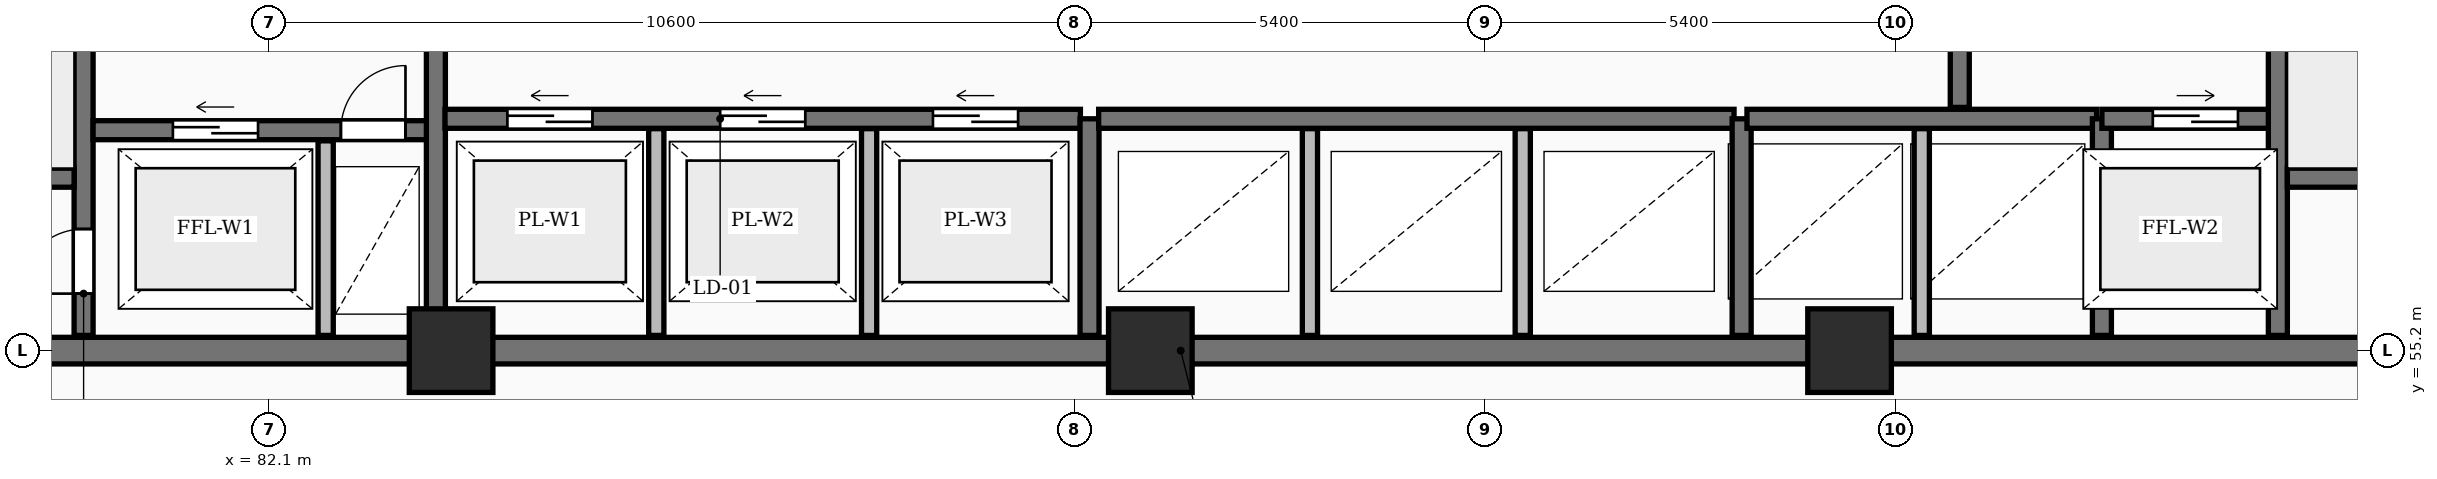
"""IFC4 building model, lengths in metres.
Left out: names, types, materials, properties, quantities, classifications, styles, units other than length and angle.
Written with IfcOpenShell. Run it as: python <this file> out.ifc"""

import sys

from ifc_helpers import new_model, si_unit, direction, frame, frame_2d, origin, origin_2d, place, context, subcontext, project, spatial, rectangle, extrude, element, fill, save


model = new_model("IFC4")
c1 = context("Model", 3, precision=1e-05, world=origin(), true_north=direction((0.0, 1.0)))
c2 = subcontext(c1, "Body", "Model", "MODEL_VIEW")
j1 = project(units=[si_unit("LENGTHUNIT", "METRE"), si_unit("PLANEANGLEUNIT", "RADIAN")], contexts=[c1])
p1 = place(None, origin())
s1 = spatial("IfcSite", under=j1, at=p1, CompositionType="ELEMENT")
p2 = place(p1, origin())
s2 = spatial("IfcBuilding", under=s1, at=p2, CompositionType="ELEMENT")
p3 = place(p2, frame((0.0, 0.0, 5.4)))
s3 = spatial("IfcBuildingStorey", under=s2, at=p3, CompositionType="ELEMENT", Elevation=5.4)
for number, where, z_axis, x_axis in (
    (1, (84.5, 55.2, 0.0), (0.0, 0.0, 1.0), (1.0, 0.0, 0.0)),
    (2, (93.7, 55.2, 0.0), (0.0, 0.0, 1.0), (1.0, 0.0, 0.0)),
    (3, (102.9, 55.2, 0.0), (0.0, 0.0, 1.0), (1.0, 0.0, 0.0)),
):
    element("IfcColumn", number, at=place(p3, frame(where, z_axis=z_axis, x_axis=x_axis)), inside=s3, PredefinedType="COLUMN", context=c2, shape_type="SweptSolid", body=[
        extrude(rectangle(XDim=1.1, YDim=1.1, at=origin_2d()), origin(), (0.0, 0.0, 1.0), 4.6),
    ])
p4 = place(p3, frame((75.95, 55.2, 0.0), z_axis=(0.0, 0.0, 1.0), x_axis=(1.0, 0.0, 0.0)))
e4 = element("IfcWall", 4, at=p4, inside=s3, PredefinedType="SHEAR", context=c2, shape_type="SweptSolid", body=[
    extrude(rectangle(XDim=36.3, YDim=0.35, at=frame_2d((18.15, 0.0))), origin(), (0.0, 0.0, 1.0), 4.6),
])
p5 = place(p3, frame((79.665, 55.4, 0.0), z_axis=(0.0, 0.0, 1.0), x_axis=(0.0, 1.0, 0.0)))
e5 = element("IfcWall", 5, at=p5, inside=s3, PredefinedType="SHEAR", context=c2, shape_type="SweptSolid", body=[
    extrude(rectangle(XDim=11.6, YDim=0.25, at=frame_2d((5.8, 0.0))), origin(), (0.0, 0.0, 1.0), 4.6),
])
p6 = place(p5, frame((0.55, 0.0, 0.0)))
e6 = element("IfcOpeningElement", 6, at=p6, cuts=e5, PredefinedType="OPENING", context=c2, shape_type="SweptSolid", body=[
    extrude(rectangle(XDim=0.85, YDim=2.05, at=frame_2d((0.425, 1.025))), frame((0.0, 0.135, 0.0), z_axis=(0.0, -1.0, 0.0), x_axis=(1.0, 0.0, 0.0)), (0.0, 0.0, 1.0), 0.27),
])
p7 = place(p5, frame((8.4, 0.0, 0.0)))
e7 = element("IfcOpeningElement", 7, at=p7, cuts=e5, PredefinedType="OPENING", context=c2, shape_type="SweptSolid", body=[
    extrude(rectangle(XDim=1.1, YDim=2.1, at=frame_2d((0.55, 1.05))), frame((0.0, 0.135, 0.0), z_axis=(0.0, -1.0, 0.0), x_axis=(1.0, 0.0, 0.0)), (0.0, 0.0, 1.0), 0.27),
])
p8 = place(p5, frame((10.25, 0.0, 0.0)))
e8 = element("IfcOpeningElement", 8, at=p8, cuts=e5, PredefinedType="OPENING", context=c2, shape_type="SweptSolid", body=[
    extrude(rectangle(XDim=0.85, YDim=2.05, at=frame_2d((0.425, 1.025))), frame((0.0, 0.135, 0.0), z_axis=(0.0, -1.0, 0.0), x_axis=(1.0, 0.0, 0.0)), (0.0, 0.0, 1.0), 0.27),
])
p9 = place(p3, frame((76.3, 57.475, 0.0), z_axis=(0.0, 0.0, 1.0), x_axis=(1.0, 0.0, 0.0)))
e9 = element("IfcWall", 9, at=p9, inside=s3, PredefinedType="SHEAR", context=c2, shape_type="SweptSolid", body=[
    extrude(rectangle(XDim=3.24, YDim=0.25, at=frame_2d((1.62, 0.0))), origin(), (0.0, 0.0, 1.0), 4.6),
])
p10 = place(p3, frame((79.79, 58.1, 0.0), z_axis=(0.0, 0.0, 1.0), x_axis=(1.0, 0.0, 0.0)))
e10 = element("IfcWall", 10, at=p10, inside=s3, PredefinedType="SHEAR", context=c2, shape_type="SweptSolid", body=[
    extrude(rectangle(XDim=4.39, YDim=0.25, at=frame_2d((2.195, 0.0))), origin(), (0.0, 0.0, 1.0), 4.6),
])
p11 = place(p10, frame((1.05, 0.0, 0.0)))
e11 = element("IfcOpeningElement", 11, at=p11, cuts=e10, PredefinedType="OPENING", context=c2, shape_type="SweptSolid", body=[
    extrude(rectangle(XDim=1.12, YDim=2.12, at=frame_2d((0.56, 1.06))), frame((0.0, 0.135, 0.0), z_axis=(0.0, -1.0, 0.0), x_axis=(1.0, 0.0, 0.0)), (0.0, 0.0, 1.0), 0.27),
])
p12 = place(p10, frame((3.26, 0.0, 0.0)))
e12 = element("IfcOpeningElement", 12, at=p12, cuts=e10, PredefinedType="OPENING", context=c2, shape_type="SweptSolid", body=[
    extrude(rectangle(XDim=0.85, YDim=2.05, at=frame_2d((0.425, 1.025))), frame((0.0, 0.135, 0.0), z_axis=(0.0, -1.0, 0.0), x_axis=(1.0, 0.0, 0.0)), (0.0, 0.0, 1.0), 0.27),
])
p13 = place(p3, frame((82.85, 55.4, 0.0), z_axis=(0.0, 0.0, 1.0), x_axis=(0.0, 1.0, 0.0)))
e13 = element("IfcWall", 13, at=p13, inside=s3, PredefinedType="PARTITIONING", context=c2, shape_type="SweptSolid", body=[
    extrude(rectangle(XDim=2.56, YDim=0.2, at=frame_2d((1.28, 0.0))), origin(), (0.0, 0.0, 1.0), 4.3),
])
p14 = place(p3, frame((84.3, 55.4, 0.0), z_axis=(0.0, 0.0, 1.0), x_axis=(0.0, 1.0, 0.0)))
e14 = element("IfcWall", 14, at=p14, inside=s3, PredefinedType="SHEAR", context=c2, shape_type="SweptSolid", body=[
    extrude(rectangle(XDim=11.6, YDim=0.25, at=frame_2d((5.8, 0.0))), origin(), (0.0, 0.0, 1.0), 4.6),
])
p15 = place(p14, frame((5.2, 0.0, 0.0)))
e15 = element("IfcOpeningElement", 15, at=p15, cuts=e14, PredefinedType="OPENING", context=c2, shape_type="SweptSolid", body=[
    extrude(rectangle(XDim=1.1, YDim=2.1, at=frame_2d((0.55, 1.05))), frame((0.0, 0.135, 0.0), z_axis=(0.0, -1.0, 0.0), x_axis=(1.0, 0.0, 0.0)), (0.0, 0.0, 1.0), 0.27),
])
for number, where, z_axis, x_axis in (
    (16, (87.2, 55.4, 0.0), (0.0, 0.0, 1.0), (0.0, 1.0, 0.0)),
    (17, (90.0, 55.4, 0.0), (0.0, 0.0, 1.0), (0.0, 1.0, 0.0)),
):
    element("IfcWall", number, at=place(p3, frame(where, z_axis=z_axis, x_axis=x_axis)), inside=s3, PredefinedType="PARTITIONING", context=c2, shape_type="SweptSolid", body=[
        extrude(rectangle(XDim=2.72, YDim=0.2, at=frame_2d((1.36, 0.0))), origin(), (0.0, 0.0, 1.0), 4.3),
    ])
p16 = place(p3, frame((84.42, 58.25, 0.0), z_axis=(0.0, 0.0, 1.0), x_axis=(1.0, 0.0, 0.0)))
e18 = element("IfcWall", 18, at=p16, inside=s3, PredefinedType="SHEAR", context=c2, shape_type="SweptSolid", body=[
    extrude(rectangle(XDim=8.36, YDim=0.25, at=frame_2d((4.18, 0.0))), origin(), (0.0, 0.0, 1.0), 4.6),
])
p17 = place(p16, frame((0.82, 0.0, 0.0)))
e19 = element("IfcOpeningElement", 19, at=p17, cuts=e18, PredefinedType="OPENING", context=c2, shape_type="SweptSolid", body=[
    extrude(rectangle(XDim=1.12, YDim=2.12, at=frame_2d((0.56, 1.06))), frame((0.0, 0.135, 0.0), z_axis=(0.0, -1.0, 0.0), x_axis=(1.0, 0.0, 0.0)), (0.0, 0.0, 1.0), 0.27),
])
p18 = place(p16, frame((3.62, 0.0, 0.0)))
e20 = element("IfcOpeningElement", 20, at=p18, cuts=e18, PredefinedType="OPENING", context=c2, shape_type="SweptSolid", body=[
    extrude(rectangle(XDim=1.12, YDim=2.12, at=frame_2d((0.56, 1.06))), frame((0.0, 0.135, 0.0), z_axis=(0.0, -1.0, 0.0), x_axis=(1.0, 0.0, 0.0)), (0.0, 0.0, 1.0), 0.27),
])
p19 = place(p16, frame((6.42, 0.0, 0.0)))
e21 = element("IfcOpeningElement", 21, at=p19, cuts=e18, PredefinedType="OPENING", context=c2, shape_type="SweptSolid", body=[
    extrude(rectangle(XDim=1.12, YDim=2.12, at=frame_2d((0.56, 1.06))), frame((0.0, 0.135, 0.0), z_axis=(0.0, -1.0, 0.0), x_axis=(1.0, 0.0, 0.0)), (0.0, 0.0, 1.0), 0.27),
])
p20 = place(p3, frame((92.9, 55.4, 0.0), z_axis=(0.0, 0.0, 1.0), x_axis=(0.0, 1.0, 0.0)))
e22 = element("IfcWall", 22, at=p20, inside=s3, PredefinedType="SHEAR", context=c2, shape_type="SweptSolid", body=[
    extrude(rectangle(XDim=2.85, YDim=0.25, at=frame_2d((1.425, 0.0))), origin(), (0.0, 0.0, 1.0), 4.6),
])
for number, where, z_axis, x_axis in (
    (23, (95.8, 55.4, 0.0), (0.0, 0.0, 1.0), (0.0, 1.0, 0.0)),
    (24, (98.6, 55.4, 0.0), (0.0, 0.0, 1.0), (0.0, 1.0, 0.0)),
):
    element("IfcWall", number, at=place(p3, frame(where, z_axis=z_axis, x_axis=x_axis)), inside=s3, PredefinedType="PARTITIONING", context=c2, shape_type="SweptSolid", body=[
        extrude(rectangle(XDim=2.72, YDim=0.2, at=frame_2d((1.36, 0.0))), origin(), (0.0, 0.0, 1.0), 4.3),
    ])
p21 = place(p3, frame((93.02, 58.25, 0.0), z_axis=(0.0, 0.0, 1.0), x_axis=(1.0, 0.0, 0.0)))
e25 = element("IfcWall", 25, at=p21, inside=s3, PredefinedType="SHEAR", context=c2, shape_type="SweptSolid", body=[
    extrude(rectangle(XDim=8.36, YDim=0.25, at=frame_2d((4.18, 0.0))), origin(), (0.0, 0.0, 1.0), 4.6),
])
p22 = place(p3, frame((101.48, 55.4, 0.0), z_axis=(0.0, 0.0, 1.0), x_axis=(0.0, 1.0, 0.0)))
e26 = element("IfcWall", 26, at=p22, inside=s3, PredefinedType="SHEAR", context=c2, shape_type="SweptSolid", body=[
    extrude(rectangle(XDim=2.85, YDim=0.25, at=frame_2d((1.425, 0.0))), origin(), (0.0, 0.0, 1.0), 4.6),
])
p23 = place(p3, frame((103.85, 55.4, 0.0), z_axis=(0.0, 0.0, 1.0), x_axis=(0.0, 1.0, 0.0)))
e27 = element("IfcWall", 27, at=p23, inside=s3, PredefinedType="PARTITIONING", context=c2, shape_type="SweptSolid", body=[
    extrude(rectangle(XDim=2.72, YDim=0.2, at=frame_2d((1.36, 0.0))), origin(), (0.0, 0.0, 1.0), 4.3),
])
p24 = place(p3, frame((101.55, 58.25, 0.0), z_axis=(0.0, 0.0, 1.0), x_axis=(1.0, 0.0, 0.0)))
e28 = element("IfcWall", 28, at=p24, inside=s3, PredefinedType="SHEAR", context=c2, shape_type="SweptSolid", body=[
    extrude(rectangle(XDim=4.6, YDim=0.25, at=frame_2d((2.3, 0.0))), origin(), (0.0, 0.0, 1.0), 4.6),
])
p25 = place(p3, frame((106.22, 55.4, 0.0), z_axis=(0.0, 0.0, 1.0), x_axis=(0.0, 1.0, 0.0)))
e29 = element("IfcWall", 29, at=p25, inside=s3, PredefinedType="SHEAR", context=c2, shape_type="SweptSolid", body=[
    extrude(rectangle(XDim=2.85, YDim=0.25, at=frame_2d((1.425, 0.0))), origin(), (0.0, 0.0, 1.0), 4.6),
])
p26 = place(p3, frame((106.22, 58.25, 0.0), z_axis=(0.0, 0.0, 1.0), x_axis=(1.0, 0.0, 0.0)))
e30 = element("IfcWall", 30, at=p26, inside=s3, PredefinedType="SHEAR", context=c2, shape_type="SweptSolid", body=[
    extrude(rectangle(XDim=2.46, YDim=0.25, at=frame_2d((1.23, 0.0))), origin(), (0.0, 0.0, 1.0), 4.6),
])
p27 = place(p26, frame((0.67, 0.0, 0.0)))
e31 = element("IfcOpeningElement", 31, at=p27, cuts=e30, PredefinedType="OPENING", context=c2, shape_type="SweptSolid", body=[
    extrude(rectangle(XDim=1.12, YDim=2.12, at=frame_2d((0.56, 1.06))), frame((0.0, 0.135, 0.0), z_axis=(0.0, -1.0, 0.0), x_axis=(1.0, 0.0, 0.0)), (0.0, 0.0, 1.0), 0.27),
])
p28 = place(p3, frame((104.35, 58.4, 0.0), z_axis=(0.0, 0.0, 1.0), x_axis=(0.0, 1.0, 0.0)))
e32 = element("IfcWall", 32, at=p28, inside=s3, PredefinedType="SHEAR", context=c2, shape_type="SweptSolid", body=[
    extrude(rectangle(XDim=8.6, YDim=0.25, at=frame_2d((4.3, 0.0))), origin(), (0.0, 0.0, 1.0), 4.6),
])
p29 = place(p28, frame((1.8, 0.0, 0.0)))
e33 = element("IfcOpeningElement", 33, at=p29, cuts=e32, PredefinedType="OPENING", context=c2, shape_type="SweptSolid", body=[
    extrude(rectangle(XDim=1.1, YDim=2.1, at=frame_2d((0.55, 1.05))), frame((0.0, 0.135, 0.0), z_axis=(0.0, -1.0, 0.0), x_axis=(1.0, 0.0, 0.0)), (0.0, 0.0, 1.0), 0.27),
])
p30 = place(p3, frame((108.535, 55.4, 0.0), z_axis=(0.0, 0.0, 1.0), x_axis=(0.0, 1.0, 0.0)))
e34 = element("IfcWall", 34, at=p30, inside=s3, PredefinedType="SHEAR", context=c2, shape_type="SweptSolid", body=[
    extrude(rectangle(XDim=11.6, YDim=0.25, at=frame_2d((5.8, 0.0))), origin(), (0.0, 0.0, 1.0), 4.6),
])
p31 = place(p30, frame((8.2, 0.0, 0.0)))
e35 = element("IfcOpeningElement", 35, at=p31, cuts=e34, PredefinedType="OPENING", context=c2, shape_type="SweptSolid", body=[
    extrude(rectangle(XDim=1.1, YDim=2.1, at=frame_2d((0.55, 1.05))), frame((0.0, 0.135, 0.0), z_axis=(0.0, -1.0, 0.0), x_axis=(1.0, 0.0, 0.0)), (0.0, 0.0, 1.0), 0.27),
])
p32 = place(p30, frame((10.25, 0.0, 0.0)))
e36 = element("IfcOpeningElement", 36, at=p32, cuts=e34, PredefinedType="OPENING", context=c2, shape_type="SweptSolid", body=[
    extrude(rectangle(XDim=0.85, YDim=2.05, at=frame_2d((0.425, 1.025))), frame((0.0, 0.135, 0.0), z_axis=(0.0, -1.0, 0.0), x_axis=(1.0, 0.0, 0.0)), (0.0, 0.0, 1.0), 0.27),
])
p33 = place(p3, frame((108.66, 57.475, 0.0), z_axis=(0.0, 0.0, 1.0), x_axis=(1.0, 0.0, 0.0)))
e37 = element("IfcWall", 37, at=p33, inside=s3, PredefinedType="SHEAR", context=c2, shape_type="SweptSolid", body=[
    extrude(rectangle(XDim=3.24, YDim=0.25, at=frame_2d((1.62, 0.0))), origin(), (0.0, 0.0, 1.0), 4.6),
])
p34 = place(p6, origin())
e38 = element("IfcDoor", 38, at=p34, inside=s3, OperationType="SINGLE_SWING_LEFT", PredefinedType="DOOR", context=c2, shape_type="SweptSolid", body=[
    extrude(rectangle(XDim=0.85, YDim=2.05, at=frame_2d((0.425, 1.025))), frame((0.0, 0.025, 0.0), z_axis=(0.0, -1.0, 0.0), x_axis=(1.0, 0.0, 0.0)), (0.0, 0.0, 1.0), 0.05),
])
fill(e6, e38)
p35 = place(p11, origin())
e39 = element("IfcDoor", 39, at=p35, inside=s3, OperationType="SLIDING_TO_LEFT", PredefinedType="DOOR", context=c2, shape_type="SweptSolid", body=[
    extrude(rectangle(XDim=1.12, YDim=2.12, at=frame_2d((0.56, 1.06))), frame((0.0, 0.025, 0.0), z_axis=(0.0, -1.0, 0.0), x_axis=(1.0, 0.0, 0.0)), (0.0, 0.0, 1.0), 0.05),
])
fill(e11, e39)
p36 = place(p12, origin())
e40 = element("IfcDoor", 40, at=p36, inside=s3, OperationType="SINGLE_SWING_RIGHT", PredefinedType="DOOR", context=c2, shape_type="SweptSolid", body=[
    extrude(rectangle(XDim=0.85, YDim=2.05, at=frame_2d((0.425, 1.025))), frame((0.0, 0.025, 0.0), z_axis=(0.0, -1.0, 0.0), x_axis=(1.0, 0.0, 0.0)), (0.0, 0.0, 1.0), 0.05),
])
fill(e12, e40)
p37 = place(p17, origin())
e41 = element("IfcDoor", 41, at=p37, inside=s3, OperationType="SLIDING_TO_LEFT", PredefinedType="DOOR", context=c2, shape_type="SweptSolid", body=[
    extrude(rectangle(XDim=1.12, YDim=2.12, at=frame_2d((0.56, 1.06))), frame((0.0, 0.025, 0.0), z_axis=(0.0, -1.0, 0.0), x_axis=(1.0, 0.0, 0.0)), (0.0, 0.0, 1.0), 0.05),
])
fill(e19, e41)
p38 = place(p18, origin())
e42 = element("IfcDoor", 42, at=p38, inside=s3, OperationType="SLIDING_TO_LEFT", PredefinedType="DOOR", context=c2, shape_type="SweptSolid", body=[
    extrude(rectangle(XDim=1.12, YDim=2.12, at=frame_2d((0.56, 1.06))), frame((0.0, 0.025, 0.0), z_axis=(0.0, -1.0, 0.0), x_axis=(1.0, 0.0, 0.0)), (0.0, 0.0, 1.0), 0.05),
])
fill(e20, e42)
p39 = place(p19, origin())
e43 = element("IfcDoor", 43, at=p39, inside=s3, OperationType="SLIDING_TO_LEFT", PredefinedType="DOOR", context=c2, shape_type="SweptSolid", body=[
    extrude(rectangle(XDim=1.12, YDim=2.12, at=frame_2d((0.56, 1.06))), frame((0.0, 0.025, 0.0), z_axis=(0.0, -1.0, 0.0), x_axis=(1.0, 0.0, 0.0)), (0.0, 0.0, 1.0), 0.05),
])
fill(e21, e43)
p40 = place(p27, origin())
e44 = element("IfcDoor", 44, at=p40, inside=s3, OperationType="SLIDING_TO_RIGHT", PredefinedType="DOOR", context=c2, shape_type="SweptSolid", body=[
    extrude(rectangle(XDim=1.12, YDim=2.12, at=frame_2d((0.56, 1.06))), frame((0.0, 0.025, 0.0), z_axis=(0.0, -1.0, 0.0), x_axis=(1.0, 0.0, 0.0)), (0.0, 0.0, 1.0), 0.05),
])
fill(e31, e44)
save(model, sys.argv[1])
